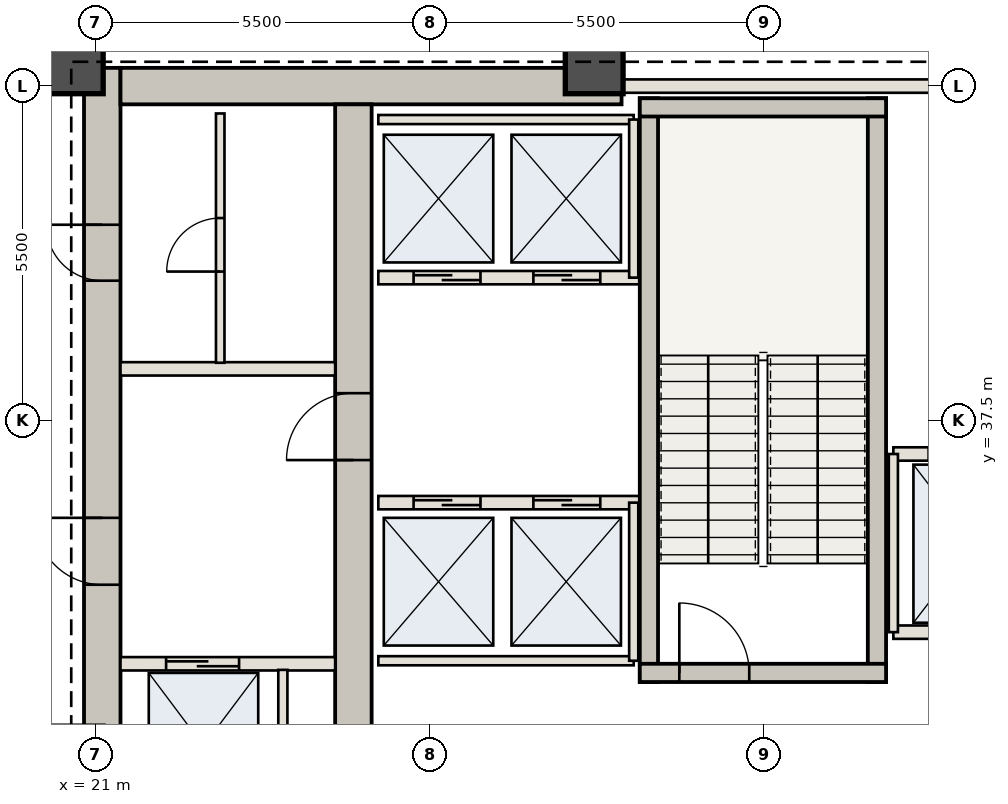
"""IFC4 building model, lengths in metres.
Left out: names, types, materials, properties, quantities, classifications, styles, units other than length and angle.
Written with IfcOpenShell. Run it as: python <this file> out.ifc"""

import sys

from ifc_helpers import new_model, si_unit, direction, frame, frame_2d, origin, origin_2d, place, context, subcontext, project, spatial, rectangle, extrude, element, fill, save


model = new_model("IFC4")
c1 = context("Model", 3, precision=1e-05, world=origin(), true_north=direction((0.0, 1.0)))
c2 = subcontext(c1, "Body", "Model", "MODEL_VIEW")
j1 = project(units=[si_unit("LENGTHUNIT", "METRE"), si_unit("PLANEANGLEUNIT", "RADIAN")], contexts=[c1])
p1 = place(None, origin())
s1 = spatial("IfcSite", under=j1, at=p1, CompositionType="ELEMENT")
p2 = place(p1, origin())
s2 = spatial("IfcBuilding", under=s1, at=p2, CompositionType="ELEMENT")
p3 = place(p2, frame((0.0, 0.0, 106.05)))
s3 = spatial("IfcBuildingStorey", under=s2, at=p3, CompositionType="ELEMENT", Elevation=106.05)
p4 = place(p3, frame((21.11, 30.6, 0.0), z_axis=(0.0, 0.0, 1.0), x_axis=(0.0, 1.0, 0.0)))
e1 = element("IfcWall", 1, at=p4, inside=s3, PredefinedType="SHEAR", context=c2, shape_type="SweptSolid", body=[
    extrude(rectangle(XDim=12.7, YDim=0.6, at=frame_2d((6.35, 0.0))), origin(), (0.0, 0.0, 1.0), 4.55),
])
p5 = place(p4, frame((4.2, 0.0, 0.0)))
e2 = element("IfcOpeningElement", 2, at=p5, cuts=e1, PredefinedType="OPENING", context=c2, shape_type="SweptSolid", body=[
    extrude(rectangle(XDim=1.1, YDim=2.15, at=frame_2d((0.55, 1.075))), frame((0.0, 0.31, 0.0), z_axis=(0.0, -1.0, 0.0), x_axis=(1.0, 0.0, 0.0)), (0.0, 0.0, 1.0), 0.62),
])
p6 = place(p4, frame((9.2, 0.0, 0.0)))
e3 = element("IfcOpeningElement", 3, at=p6, cuts=e1, PredefinedType="OPENING", context=c2, shape_type="SweptSolid", body=[
    extrude(rectangle(XDim=0.92, YDim=2.1, at=frame_2d((0.46, 1.05))), frame((0.0, 0.31, 0.0), z_axis=(0.0, -1.0, 0.0), x_axis=(1.0, 0.0, 0.0)), (0.0, 0.0, 1.0), 0.62),
])
p7 = place(p3, frame((21.41, 43.0, 0.0), z_axis=(0.0, 0.0, 1.0), x_axis=(1.0, 0.0, 0.0)))
e4 = element("IfcWall", 4, at=p7, inside=s3, PredefinedType="SHEAR", context=c2, shape_type="SweptSolid", body=[
    extrude(rectangle(XDim=8.24, YDim=0.6, at=frame_2d((4.12, 0.0))), origin(), (0.0, 0.0, 1.0), 4.55),
])
p8 = place(p3, frame((25.24, 30.6, 0.0), z_axis=(0.0, 0.0, 1.0), x_axis=(0.0, 1.0, 0.0)))
e5 = element("IfcWall", 5, at=p8, inside=s3, PredefinedType="SHEAR", context=c2, shape_type="SweptSolid", body=[
    extrude(rectangle(XDim=12.1, YDim=0.6, at=frame_2d((6.05, 0.0))), origin(), (0.0, 0.0, 1.0), 4.55),
])
p9 = place(p8, frame((6.25, 0.0, 0.0)))
e6 = element("IfcOpeningElement", 6, at=p9, cuts=e5, PredefinedType="OPENING", context=c2, shape_type="SweptSolid", body=[
    extrude(rectangle(XDim=1.1, YDim=2.15, at=frame_2d((0.55, 1.075))), frame((0.0, 0.31, 0.0), z_axis=(0.0, -1.0, 0.0), x_axis=(1.0, 0.0, 0.0)), (0.0, 0.0, 1.0), 0.62),
])
for number, where, z_axis, x_axis in (
    (7, (29.2, 43.35, 0.0), (0.0, 0.0, 1.0), (1.0, 0.0, 0.0)),
    (8, (20.65, 43.35, 0.0), (0.0, 0.0, 1.0), (1.0, 0.0, 0.0)),
):
    element("IfcColumn", number, at=place(p3, frame(where, z_axis=z_axis, x_axis=x_axis)), inside=s3, PredefinedType="COLUMN", context=c2, shape_type="SweptSolid", body=[
        extrude(rectangle(XDim=0.95, YDim=0.95, at=origin_2d()), origin(), (0.0, 0.0, 1.0), 4.55),
    ])
p10 = place(p3, frame((21.41, 33.5, 0.0), z_axis=(0.0, 0.0, 1.0), x_axis=(1.0, 0.0, 0.0)))
e9 = element("IfcWall", 9, at=p10, inside=s3, PredefinedType="STANDARD", context=c2, shape_type="SweptSolid", body=[
    extrude(rectangle(XDim=3.53, YDim=0.22, at=frame_2d((1.765, 0.0))), origin(), (0.0, 0.0, 1.0), 4.13),
])
p11 = place(p10, frame((0.75, 0.0, 0.0)))
e10 = element("IfcOpeningElement", 10, at=p11, cuts=e9, PredefinedType="OPENING", context=c2, shape_type="SweptSolid", body=[
    extrude(rectangle(XDim=1.2, YDim=2.2, at=frame_2d((0.6, 1.1))), frame((0.0, 0.12, 0.0), z_axis=(0.0, -1.0, 0.0), x_axis=(1.0, 0.0, 0.0)), (0.0, 0.0, 1.0), 0.24),
])
p12 = place(p3, frame((24.08, 30.75, 0.0), z_axis=(0.0, 0.0, 1.0), x_axis=(0.0, 1.0, 0.0)))
e11 = element("IfcWall", 11, at=p12, inside=s3, PredefinedType="STANDARD", context=c2, shape_type="SweptSolid", body=[
    extrude(rectangle(XDim=2.65, YDim=0.15, at=frame_2d((1.325, 0.0))), origin(), (0.0, 0.0, 1.0), 4.13),
])
p13 = place(p3, frame((21.41, 38.35, 0.0), z_axis=(0.0, 0.0, 1.0), x_axis=(1.0, 0.0, 0.0)))
e12 = element("IfcWall", 12, at=p13, inside=s3, PredefinedType="STANDARD", context=c2, shape_type="SweptSolid", body=[
    extrude(rectangle(XDim=3.53, YDim=0.22, at=frame_2d((1.765, 0.0))), origin(), (0.0, 0.0, 1.0), 4.13),
])
p14 = place(p3, frame((23.05, 38.45, 0.0), z_axis=(0.0, 0.0, 1.0), x_axis=(0.0, 1.0, 0.0)))
e13 = element("IfcWall", 13, at=p14, inside=s3, PredefinedType="STANDARD", context=c2, shape_type="SweptSolid", body=[
    extrude(rectangle(XDim=4.1, YDim=0.14, at=frame_2d((2.05, 0.0))), origin(), (0.0, 0.0, 1.0), 4.13),
])
p15 = place(p14, frame((1.5, 0.0, 0.0)))
e14 = element("IfcOpeningElement", 14, at=p15, cuts=e13, PredefinedType="OPENING", context=c2, shape_type="SweptSolid", body=[
    extrude(rectangle(XDim=0.88, YDim=2.1, at=frame_2d((0.44, 1.05))), frame((0.0, 0.08, 0.0), z_axis=(0.0, -1.0, 0.0), x_axis=(1.0, 0.0, 0.0)), (0.0, 0.0, 1.0), 0.16),
])
p16 = place(p3, frame((25.65, 36.15, 0.0), z_axis=(0.0, 0.0, 1.0), x_axis=(1.0, 0.0, 0.0)))
e15 = element("IfcWall", 15, at=p16, inside=s3, PredefinedType="STANDARD", context=c2, shape_type="SweptSolid", body=[
    extrude(rectangle(XDim=4.3, YDim=0.22, at=frame_2d((2.15, 0.0))), origin(), (0.0, 0.0, 1.0), 4.13),
])
p17 = place(p16, frame((0.58, 0.0, 0.0)))
e16 = element("IfcOpeningElement", 16, at=p17, cuts=e15, PredefinedType="OPENING", context=c2, shape_type="SweptSolid", body=[
    extrude(rectangle(XDim=1.1, YDim=2.15, at=frame_2d((0.55, 1.075))), frame((0.0, 0.12, 0.0), z_axis=(0.0, -1.0, 0.0), x_axis=(1.0, 0.0, 0.0)), (0.0, 0.0, 1.0), 0.24),
])
p18 = place(p16, frame((2.55, 0.0, 0.0)))
e17 = element("IfcOpeningElement", 17, at=p18, cuts=e15, PredefinedType="OPENING", context=c2, shape_type="SweptSolid", body=[
    extrude(rectangle(XDim=1.1, YDim=2.15, at=frame_2d((0.55, 1.075))), frame((0.0, 0.12, 0.0), z_axis=(0.0, -1.0, 0.0), x_axis=(1.0, 0.0, 0.0)), (0.0, 0.0, 1.0), 0.24),
])
p19 = place(p3, frame((25.65, 33.55, 0.0), z_axis=(0.0, 0.0, 1.0), x_axis=(1.0, 0.0, 0.0)))
e18 = element("IfcWall", 18, at=p19, inside=s3, PredefinedType="STANDARD", context=c2, shape_type="SweptSolid", body=[
    extrude(rectangle(XDim=4.2, YDim=0.15, at=frame_2d((2.1, 0.0))), origin(), (0.0, 0.0, 1.0), 4.13),
])
p20 = place(p3, frame((29.85, 33.55, 0.0), z_axis=(0.0, 0.0, 1.0), x_axis=(0.0, 1.0, 0.0)))
e19 = element("IfcWall", 19, at=p20, inside=s3, PredefinedType="STANDARD", context=c2, shape_type="SweptSolid", body=[
    extrude(rectangle(XDim=2.6, YDim=0.15, at=frame_2d((1.3, 0.0))), origin(), (0.0, 0.0, 1.0), 4.13),
])
p21 = place(p3, frame((25.65, 39.85, 0.0), z_axis=(0.0, 0.0, 1.0), x_axis=(1.0, 0.0, 0.0)))
e20 = element("IfcWall", 20, at=p21, inside=s3, PredefinedType="STANDARD", context=c2, shape_type="SweptSolid", body=[
    extrude(rectangle(XDim=4.3, YDim=0.22, at=frame_2d((2.15, 0.0))), origin(), (0.0, 0.0, 1.0), 4.13),
])
p22 = place(p21, frame((0.58, 0.0, 0.0)))
e21 = element("IfcOpeningElement", 21, at=p22, cuts=e20, PredefinedType="OPENING", context=c2, shape_type="SweptSolid", body=[
    extrude(rectangle(XDim=1.1, YDim=2.15, at=frame_2d((0.55, 1.075))), frame((0.0, 0.12, 0.0), z_axis=(0.0, -1.0, 0.0), x_axis=(1.0, 0.0, 0.0)), (0.0, 0.0, 1.0), 0.24),
])
p23 = place(p21, frame((2.55, 0.0, 0.0)))
e22 = element("IfcOpeningElement", 22, at=p23, cuts=e20, PredefinedType="OPENING", context=c2, shape_type="SweptSolid", body=[
    extrude(rectangle(XDim=1.1, YDim=2.15, at=frame_2d((0.55, 1.075))), frame((0.0, 0.12, 0.0), z_axis=(0.0, -1.0, 0.0), x_axis=(1.0, 0.0, 0.0)), (0.0, 0.0, 1.0), 0.24),
])
p24 = place(p3, frame((25.65, 42.45, 0.0), z_axis=(0.0, 0.0, 1.0), x_axis=(1.0, 0.0, 0.0)))
e23 = element("IfcWall", 23, at=p24, inside=s3, PredefinedType="STANDARD", context=c2, shape_type="SweptSolid", body=[
    extrude(rectangle(XDim=4.2, YDim=0.15, at=frame_2d((2.1, 0.0))), origin(), (0.0, 0.0, 1.0), 4.13),
])
p25 = place(p3, frame((29.85, 39.85, 0.0), z_axis=(0.0, 0.0, 1.0), x_axis=(0.0, 1.0, 0.0)))
e24 = element("IfcWall", 24, at=p25, inside=s3, PredefinedType="STANDARD", context=c2, shape_type="SweptSolid", body=[
    extrude(rectangle(XDim=2.6, YDim=0.15, at=frame_2d((1.3, 0.0))), origin(), (0.0, 0.0, 1.0), 4.13),
])
for number, where, z_axis, x_axis in (
    (25, (30.1, 33.2, 0.0), (0.0, 0.0, 1.0), (0.0, 1.0, 0.0)),
    (26, (33.85, 33.2, 0.0), (0.0, 0.0, 1.0), (0.0, 1.0, 0.0)),
):
    element("IfcWall", number, at=place(p3, frame(where, z_axis=z_axis, x_axis=x_axis)), inside=s3, PredefinedType="SHEAR", context=c2, shape_type="SweptSolid", body=[
        extrude(rectangle(XDim=9.6, YDim=0.3, at=frame_2d((4.8, 0.0))), origin(), (0.0, 0.0, 1.0), 4.13),
    ])
p26 = place(p3, frame((29.95, 33.35, 0.0), z_axis=(0.0, 0.0, 1.0), x_axis=(1.0, 0.0, 0.0)))
e27 = element("IfcWall", 27, at=p26, inside=s3, PredefinedType="SHEAR", context=c2, shape_type="SweptSolid", body=[
    extrude(rectangle(XDim=4.05, YDim=0.3, at=frame_2d((2.025, 0.0))), origin(), (0.0, 0.0, 1.0), 4.13),
])
p27 = place(p26, frame((0.65, 0.0, 0.0)))
e28 = element("IfcOpeningElement", 28, at=p27, cuts=e27, PredefinedType="OPENING", context=c2, shape_type="SweptSolid", body=[
    extrude(rectangle(XDim=1.15, YDim=2.15, at=frame_2d((0.575, 1.075))), frame((0.0, 0.16, 0.0), z_axis=(0.0, -1.0, 0.0), x_axis=(1.0, 0.0, 0.0)), (0.0, 0.0, 1.0), 0.32),
])
p28 = place(p3, frame((29.95, 42.65, 0.0), z_axis=(0.0, 0.0, 1.0), x_axis=(1.0, 0.0, 0.0)))
e29 = element("IfcWall", 29, at=p28, inside=s3, PredefinedType="SHEAR", context=c2, shape_type="SweptSolid", body=[
    extrude(rectangle(XDim=4.05, YDim=0.3, at=frame_2d((2.025, 0.0))), origin(), (0.0, 0.0, 1.0), 4.13),
])
p29 = place(p3, frame((29.65, 43.0, 0.0), z_axis=(0.0, 0.0, 1.0), x_axis=(1.0, 0.0, 0.0)))
e30 = element("IfcWall", 30, at=p29, inside=s3, PredefinedType="STANDARD", context=c2, shape_type="SweptSolid", body=[
    extrude(rectangle(XDim=8.1, YDim=0.22, at=frame_2d((4.05, 0.0))), origin(), (0.0, 0.0, 1.0), 4.13),
])
p30 = place(p29, frame((5.95, 0.0, 0.0)))
e31 = element("IfcOpeningElement", 31, at=p30, cuts=e30, PredefinedType="OPENING", context=c2, shape_type="SweptSolid", body=[
    extrude(rectangle(XDim=1.1, YDim=2.15, at=frame_2d((0.55, 1.075))), frame((0.0, 0.12, 0.0), z_axis=(0.0, -1.0, 0.0), x_axis=(1.0, 0.0, 0.0)), (0.0, 0.0, 1.0), 0.24),
])
p31 = place(p3, frame((34.12, 36.95, 0.0), z_axis=(0.0, 0.0, 1.0), x_axis=(1.0, 0.0, 0.0)))
e32 = element("IfcWall", 32, at=p31, inside=s3, PredefinedType="STANDARD", context=c2, shape_type="SweptSolid", body=[
    extrude(rectangle(XDim=2.68, YDim=0.22, at=frame_2d((1.34, 0.0))), origin(), (0.0, 0.0, 1.0), 4.13),
])
p32 = place(p31, frame((0.58, 0.0, 0.0)))
e33 = element("IfcOpeningElement", 33, at=p32, cuts=e32, PredefinedType="OPENING", context=c2, shape_type="SweptSolid", body=[
    extrude(rectangle(XDim=1.2, YDim=2.2, at=frame_2d((0.6, 1.1))), frame((0.0, 0.12, 0.0), z_axis=(0.0, -1.0, 0.0), x_axis=(1.0, 0.0, 0.0)), (0.0, 0.0, 1.0), 0.24),
])
p33 = place(p3, frame((34.12, 34.02, 0.0), z_axis=(0.0, 0.0, 1.0), x_axis=(1.0, 0.0, 0.0)))
e34 = element("IfcWall", 34, at=p33, inside=s3, PredefinedType="STANDARD", context=c2, shape_type="SweptSolid", body=[
    extrude(rectangle(XDim=2.68, YDim=0.22, at=frame_2d((1.34, 0.0))), origin(), (0.0, 0.0, 1.0), 4.13),
])
p34 = place(p3, frame((34.12, 34.02, 0.0), z_axis=(0.0, 0.0, 1.0), x_axis=(0.0, 1.0, 0.0)))
e35 = element("IfcWall", 35, at=p34, inside=s3, PredefinedType="STANDARD", context=c2, shape_type="SweptSolid", body=[
    extrude(rectangle(XDim=2.93, YDim=0.15, at=frame_2d((1.465, 0.0))), origin(), (0.0, 0.0, 1.0), 4.13),
])
p35 = place(p5, origin())
e36 = element("IfcDoor", 36, at=p35, inside=s3, OperationType="SINGLE_SWING_RIGHT", PredefinedType="DOOR", context=c2, shape_type="SweptSolid", body=[
    extrude(rectangle(XDim=1.1, YDim=2.15, at=frame_2d((0.55, 1.075))), frame((0.0, 0.025, 0.0), z_axis=(0.0, -1.0, 0.0), x_axis=(1.0, 0.0, 0.0)), (0.0, 0.0, 1.0), 0.05),
])
fill(e2, e36)
p36 = place(p9, origin())
e37 = element("IfcDoor", 37, at=p36, inside=s3, OperationType="SINGLE_SWING_LEFT", PredefinedType="DOOR", context=c2, shape_type="SweptSolid", body=[
    extrude(rectangle(XDim=1.1, YDim=2.15, at=frame_2d((0.55, 1.075))), frame((0.0, 0.025, 0.0), z_axis=(0.0, -1.0, 0.0), x_axis=(1.0, 0.0, 0.0)), (0.0, 0.0, 1.0), 0.05),
])
fill(e6, e37)
p37 = place(p6, origin())
e38 = element("IfcDoor", 38, at=p37, inside=s3, OperationType="SINGLE_SWING_RIGHT", PredefinedType="DOOR", context=c2, shape_type="SweptSolid", body=[
    extrude(rectangle(XDim=0.92, YDim=2.1, at=frame_2d((0.46, 1.05))), frame((0.0, 0.025, 0.0), z_axis=(0.0, -1.0, 0.0), x_axis=(1.0, 0.0, 0.0)), (0.0, 0.0, 1.0), 0.05),
])
fill(e3, e38)
p38 = place(p11, origin())
e39 = element("IfcDoor", 39, at=p38, inside=s3, OperationType="DOUBLE_DOOR_SLIDING", PredefinedType="DOOR", context=c2, shape_type="SweptSolid", body=[
    extrude(rectangle(XDim=1.2, YDim=2.2, at=frame_2d((0.6, 1.1))), frame((0.0, 0.025, 0.0), z_axis=(0.0, -1.0, 0.0), x_axis=(1.0, 0.0, 0.0)), (0.0, 0.0, 1.0), 0.05),
])
fill(e10, e39)
p39 = place(p15, origin())
e40 = element("IfcDoor", 40, at=p39, inside=s3, OperationType="SINGLE_SWING_LEFT", PredefinedType="DOOR", context=c2, shape_type="SweptSolid", body=[
    extrude(rectangle(XDim=0.88, YDim=2.1, at=frame_2d((0.44, 1.05))), frame((0.0, 0.025, 0.0), z_axis=(0.0, -1.0, 0.0), x_axis=(1.0, 0.0, 0.0)), (0.0, 0.0, 1.0), 0.05),
])
fill(e14, e40)
p40 = place(p17, origin())
e41 = element("IfcDoor", 41, at=p40, inside=s3, OperationType="DOUBLE_DOOR_SLIDING", PredefinedType="DOOR", context=c2, shape_type="SweptSolid", body=[
    extrude(rectangle(XDim=1.1, YDim=2.15, at=frame_2d((0.55, 1.075))), frame((0.0, 0.025, 0.0), z_axis=(0.0, -1.0, 0.0), x_axis=(1.0, 0.0, 0.0)), (0.0, 0.0, 1.0), 0.05),
])
fill(e16, e41)
p41 = place(p18, origin())
e42 = element("IfcDoor", 42, at=p41, inside=s3, OperationType="DOUBLE_DOOR_SLIDING", PredefinedType="DOOR", context=c2, shape_type="SweptSolid", body=[
    extrude(rectangle(XDim=1.1, YDim=2.15, at=frame_2d((0.55, 1.075))), frame((0.0, 0.025, 0.0), z_axis=(0.0, -1.0, 0.0), x_axis=(1.0, 0.0, 0.0)), (0.0, 0.0, 1.0), 0.05),
])
fill(e17, e42)
p42 = place(p22, origin())
e43 = element("IfcDoor", 43, at=p42, inside=s3, OperationType="DOUBLE_DOOR_SLIDING", PredefinedType="DOOR", context=c2, shape_type="SweptSolid", body=[
    extrude(rectangle(XDim=1.1, YDim=2.15, at=frame_2d((0.55, 1.075))), frame((0.0, 0.025, 0.0), z_axis=(0.0, -1.0, 0.0), x_axis=(1.0, 0.0, 0.0)), (0.0, 0.0, 1.0), 0.05),
])
fill(e21, e43)
p43 = place(p23, origin())
e44 = element("IfcDoor", 44, at=p43, inside=s3, OperationType="DOUBLE_DOOR_SLIDING", PredefinedType="DOOR", context=c2, shape_type="SweptSolid", body=[
    extrude(rectangle(XDim=1.1, YDim=2.15, at=frame_2d((0.55, 1.075))), frame((0.0, 0.025, 0.0), z_axis=(0.0, -1.0, 0.0), x_axis=(1.0, 0.0, 0.0)), (0.0, 0.0, 1.0), 0.05),
])
fill(e22, e44)
p44 = place(p27, origin())
e45 = element("IfcDoor", 45, at=p44, inside=s3, OperationType="SINGLE_SWING_LEFT", PredefinedType="DOOR", context=c2, shape_type="SweptSolid", body=[
    extrude(rectangle(XDim=1.15, YDim=2.15, at=frame_2d((0.575, 1.075))), frame((0.0, 0.025, 0.0), z_axis=(0.0, -1.0, 0.0), x_axis=(1.0, 0.0, 0.0)), (0.0, 0.0, 1.0), 0.05),
])
fill(e28, e45)
save(model, sys.argv[1])
